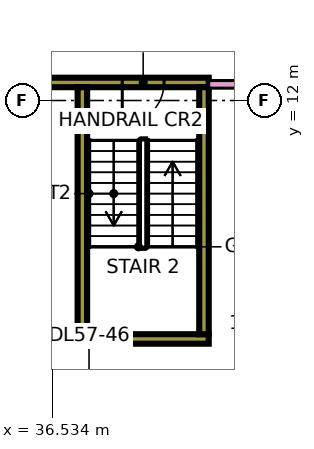
"""IFC4 building model, lengths in metres.
Left out: names, types, materials, properties, quantities, classifications, styles, units other than length and angle.
Written with IfcOpenShell. Run it as: python <this file> out.ifc"""

import sys

from ifc_helpers import new_model, si_unit, direction, frame, frame_2d, origin, place, context, subcontext, project, spatial, rectangle, extrude, element, fill, save


model = new_model("IFC4")
c1 = context("Model", 3, precision=1e-05, world=origin(), true_north=direction((0.0, 1.0)))
c2 = subcontext(c1, "Body", "Model", "MODEL_VIEW")
j1 = project(units=[si_unit("LENGTHUNIT", "METRE"), si_unit("PLANEANGLEUNIT", "RADIAN")], contexts=[c1])
p1 = place(None, origin())
s1 = spatial("IfcSite", under=j1, at=p1, CompositionType="ELEMENT")
p2 = place(p1, origin())
s2 = spatial("IfcBuilding", under=s1, at=p2, CompositionType="ELEMENT")
p3 = place(p2, frame((0.0, 0.0, 241.65)))
s3 = spatial("IfcBuildingStorey", under=s2, at=p3, CompositionType="ELEMENT", Elevation=241.65)
p4 = place(p3, frame((37.2, 5.725, 0.0), z_axis=(0.0, 0.0, 1.0), x_axis=(1.0, 0.0, 0.0)))
e1 = element("IfcWall", 1, at=p4, inside=s3, PredefinedType="SHEAR", context=c2, shape_type="SweptSolid", body=[
    extrude(rectangle(XDim=3.45, YDim=0.25, at=frame_2d((1.725, 0.0))), origin(), (0.0, 0.0, 1.0), 3.75),
])
p5 = place(p3, frame((36.425, 12.475, 0.0), z_axis=(0.0, 0.0, 1.0), x_axis=(1.0, 0.0, 0.0)))
e2 = element("IfcWall", 2, at=p5, inside=s3, PredefinedType="SHEAR", context=c2, shape_type="SweptSolid", body=[
    extrude(rectangle(XDim=4.225, YDim=0.25, at=frame_2d((2.112, 0.0))), origin(), (0.0, 0.0, 1.0), 3.75),
])
p6 = place(p5, frame((1.95, 0.0, 0.0)))
e3 = element("IfcOpeningElement", 3, at=p6, cuts=e2, PredefinedType="OPENING", context=c2, shape_type="SweptSolid", body=[
    extrude(rectangle(XDim=1.1, YDim=2.2, at=frame_2d((0.55, 1.1))), frame((0.0, 0.135, 0.0), z_axis=(0.0, -1.0, 0.0), x_axis=(1.0, 0.0, 0.0)), (0.0, 0.0, 1.0), 0.27),
])
for number, where, z_axis, x_axis in (
    (4, (37.325, 5.85, 0.0), (0.0, 0.0, 1.0), (0.0, 1.0, 0.0)),
    (5, (40.525, 5.85, 0.0), (0.0, 0.0, 1.0), (0.0, 1.0, 0.0)),
):
    element("IfcWall", number, at=place(p3, frame(where, z_axis=z_axis, x_axis=x_axis)), inside=s3, PredefinedType="SHEAR", context=c2, shape_type="SweptSolid", body=[
        extrude(rectangle(XDim=6.5, YDim=0.25, at=frame_2d((3.25, 0.0))), origin(), (0.0, 0.0, 1.0), 3.75),
    ])
p7 = place(p3, frame((40.65, 12.425, 0.0), z_axis=(0.0, 0.0, 1.0), x_axis=(1.0, 0.0, 0.0)))
e6 = element("IfcWall", 6, at=p7, inside=s3, PredefinedType="PARTITIONING", context=c2, shape_type="SweptSolid", body=[
    extrude(rectangle(XDim=22.35, YDim=0.2, at=frame_2d((11.175, 0.0))), origin(), (0.0, 0.0, 1.0), 3.35),
])
p8 = place(p7, frame((14.7, 0.0, 0.0)))
e7 = element("IfcOpeningElement", 7, at=p8, cuts=e6, PredefinedType="OPENING", context=c2, shape_type="SweptSolid", body=[
    extrude(rectangle(XDim=1.0, YDim=2.1, at=frame_2d((0.5, 1.05))), frame((0.0, 0.11, 0.0), z_axis=(0.0, -1.0, 0.0), x_axis=(1.0, 0.0, 0.0)), (0.0, 0.0, 1.0), 0.22),
])
p9 = place(p7, frame((1.05, 0.0, 0.0)))
e8 = element("IfcOpeningElement", 8, at=p9, cuts=e6, PredefinedType="OPENING", context=c2, shape_type="SweptSolid", body=[
    extrude(rectangle(XDim=1.0, YDim=2.1, at=frame_2d((0.5, 1.05))), frame((0.0, 0.11, 0.0), z_axis=(0.0, -1.0, 0.0), x_axis=(1.0, 0.0, 0.0)), (0.0, 0.0, 1.0), 0.22),
])
p10 = place(p6, frame((1.1, 0.0, 0.0), z_axis=(0.0, 0.0, 1.0), x_axis=(-1.0, 0.0, 0.0)))
e9 = element("IfcDoor", 9, at=p10, inside=s3, OperationType="SINGLE_SWING_LEFT", PredefinedType="DOOR", context=c2, shape_type="SweptSolid", body=[
    extrude(rectangle(XDim=1.1, YDim=2.2, at=frame_2d((0.55, 1.1))), frame((0.0, 0.025, 0.0), z_axis=(0.0, -1.0, 0.0), x_axis=(1.0, 0.0, 0.0)), (0.0, 0.0, 1.0), 0.05),
])
fill(e3, e9)
save(model, sys.argv[1])
